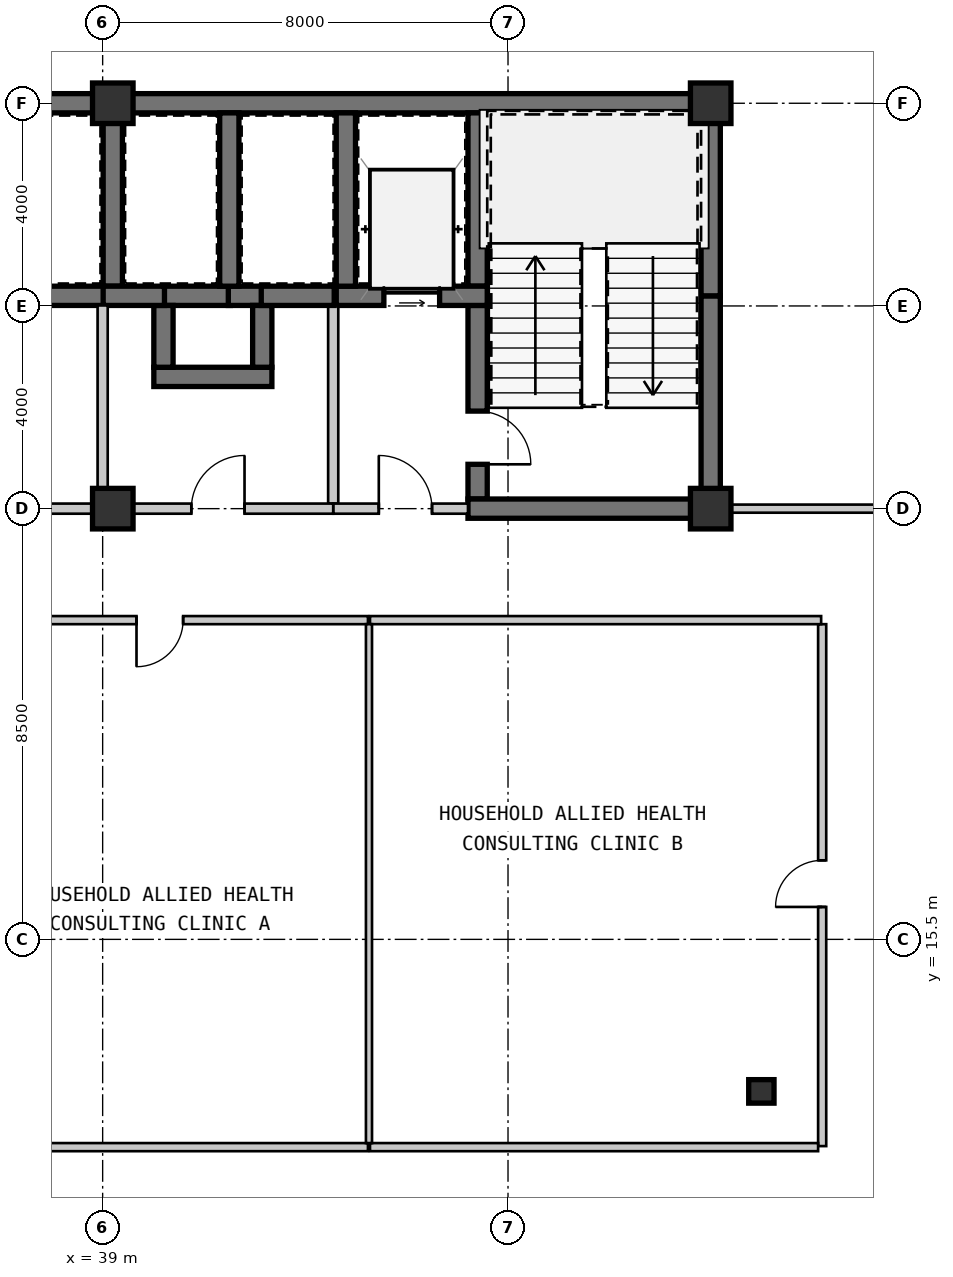
"""IFC4 building model, lengths in metres.
Left out: names, types, materials, properties, quantities, classifications, styles, units other than length and angle.
Written with IfcOpenShell. Run it as: python <this file> out.ifc"""

import sys

from ifc_helpers import new_model, si_unit, direction, frame, frame_2d, origin, origin_2d, place, context, subcontext, project, spatial, rectangle, i_section, extrude, source, transform, mapped, element, fill, save


model = new_model("IFC4")
c1 = context("Model", 3, precision=1e-05, world=origin(), true_north=direction((0.0, 1.0)))
c2 = subcontext(c1, "Body", "Model", "MODEL_VIEW")
j1 = project(units=[si_unit("LENGTHUNIT", "METRE"), si_unit("PLANEANGLEUNIT", "RADIAN")], contexts=[c1])
p1 = place(None, origin())
s1 = spatial("IfcSite", under=j1, at=p1, CompositionType="ELEMENT")
p2 = place(p1, origin())
s2 = spatial("IfcBuilding", under=s1, at=p2, CompositionType="ELEMENT")
p3 = place(p2, frame((0.0, 0.0, 57.75)))
s3 = spatial("IfcBuildingStorey", under=s2, at=p3, CompositionType="ELEMENT", Elevation=57.75)
m1 = source(origin(), c2, "Body", "SweptSolid", [
    extrude(rectangle(XDim=0.8, YDim=0.8, at=origin_2d()), origin(), (0.0, 0.0, 1.0), 3.15),
])
for number, where, z_axis, x_axis in (
    (1, (39.2, 24.0, 0.0), (0.0, 0.0, 1.0), (1.0, 0.0, 0.0)),
    (2, (51.0, 24.0, 0.0), (0.0, 0.0, 1.0), (1.0, 0.0, 0.0)),
    (3, (39.2, 32.0, 0.0), (0.0, 0.0, 1.0), (1.0, 0.0, 0.0)),
    (4, (51.0, 32.0, 0.0), (0.0, 0.0, 1.0), (1.0, 0.0, 0.0)),
):
    element("IfcColumn", number, at=place(p3, frame(where, z_axis=z_axis, x_axis=x_axis)), inside=s3, PredefinedType="COLUMN", context=c2, shape_type="MappedRepresentation", body=[
        mapped(m1, transform((0.0, 0.0, 0.0), scale=1.0)),
    ])
m2 = source(origin(), c2, "Body", "SweptSolid", [
    extrude(i_section(OverallWidth=0.5, OverallDepth=0.464, WebThickness=0.022, FlangeThickness=0.034, at=origin_2d()), origin(), (0.0, 0.0, 1.0), 3.15),
])
p4 = place(p3, frame((52.0, 12.5, 0.0), z_axis=(0.0, 0.0, 1.0), x_axis=(1.0, 0.0, 0.0)))
e5 = element("IfcColumn", 5, at=p4, inside=s3, PredefinedType="COLUMN", context=c2, shape_type="MappedRepresentation", body=[
    mapped(m2, transform((0.0, 0.0, 0.0), scale=1.0)),
])
m3 = source(origin(), c2, "Body", "SweptSolid", [
    extrude(rectangle(XDim=11.2, YDim=0.38, at=frame_2d((5.6, 0.0))), origin(), (0.0, 0.0, 1.0), 2.87),
])
p5 = place(p3, frame((28.0, 32.0, 0.0), z_axis=(0.0, 0.0, 1.0), x_axis=(1.0, 0.0, 0.0)))
e6 = element("IfcWall", 6, at=p5, inside=s3, PredefinedType="SHEAR", context=c2, shape_type="MappedRepresentation", body=[
    mapped(m3, transform((0.0, 0.0, 0.0), scale=1.0)),
])
m4 = source(origin(), c2, "Body", "SweptSolid", [
    extrude(rectangle(XDim=11.99, YDim=0.38, at=frame_2d((5.995, 0.0))), origin(), (0.0, 0.0, 1.0), 2.87),
])
p6 = place(p3, frame((39.2, 32.0, 0.0), z_axis=(0.0, 0.0, 1.0), x_axis=(1.0, 0.0, 0.0)))
e7 = element("IfcWall", 7, at=p6, inside=s3, PredefinedType="SHEAR", context=c2, shape_type="MappedRepresentation", body=[
    mapped(m4, transform((0.0, 0.0, 0.0), scale=1.0)),
])
m5 = source(origin(), c2, "Body", "SweptSolid", [
    extrude(rectangle(XDim=4.01, YDim=0.38, at=frame_2d((2.005, 0.0))), origin(), (0.0, 0.0, 1.0), 2.87),
])
p7 = place(p3, frame((51.0, 24.19, 0.0), z_axis=(0.0, 0.0, 1.0), x_axis=(0.0, 1.0, 0.0)))
e8 = element("IfcWall", 8, at=p7, inside=s3, PredefinedType="SHEAR", context=c2, shape_type="MappedRepresentation", body=[
    mapped(m5, transform((0.0, 0.0, 0.0), scale=1.0)),
])
m6 = source(origin(), c2, "Body", "SweptSolid", [
    extrude(rectangle(XDim=3.61, YDim=0.38, at=frame_2d((1.805, 0.0))), origin(), (0.0, 0.0, 1.0), 2.87),
])
p8 = place(p3, frame((51.0, 28.2, 0.0), z_axis=(0.0, 0.0, 1.0), x_axis=(0.0, 1.0, 0.0)))
e9 = element("IfcWall", 9, at=p8, inside=s3, PredefinedType="SHEAR", context=c2, shape_type="MappedRepresentation", body=[
    mapped(m6, transform((0.0, 0.0, 0.0), scale=1.0)),
])
m7 = source(origin(), c2, "Body", "SweptSolid", [
    extrude(rectangle(XDim=3.42, YDim=0.38, at=frame_2d((1.71, 0.0))), origin(), (0.0, 0.0, 1.0), 2.87),
])
p9 = place(p3, frame((46.4, 31.81, 0.0), z_axis=(0.0, 0.0, 1.0), x_axis=(0.0, -1.0, 0.0)))
e10 = element("IfcWall", 10, at=p9, inside=s3, PredefinedType="SHEAR", context=c2, shape_type="MappedRepresentation", body=[
    mapped(m7, transform((0.0, 0.0, 0.0), scale=1.0)),
])
m8 = source(origin(), c2, "Body", "SweptSolid", [
    extrude(rectangle(XDim=3.82, YDim=0.38, at=frame_2d((1.91, 0.0))), origin(), (0.0, 0.0, 1.0), 2.87),
])
p10 = place(p3, frame((46.4, 28.01, 0.0), z_axis=(0.0, 0.0, 1.0), x_axis=(0.0, -1.0, 0.0)))
e11 = element("IfcWall", 11, at=p10, inside=s3, PredefinedType="SHEAR", context=c2, shape_type="MappedRepresentation", body=[
    mapped(m8, transform((0.0, 0.0, 0.0), scale=1.0)),
])
m9 = source(origin(), c2, "Body", "SweptSolid", [
    extrude(rectangle(XDim=1.05, YDim=2.1, at=frame_2d((0.525, 1.05))), frame((0.0, 0.2, 0.0), z_axis=(0.0, -1.0, 0.0), x_axis=(1.0, 0.0, 0.0)), (0.0, 0.0, 1.0), 0.4),
])
p11 = place(p10, frame((2.085, 0.0, 0.0)))
e12 = element("IfcOpeningElement", 12, at=p11, cuts=e11, PredefinedType="OPENING", context=c2, shape_type="MappedRepresentation", body=[
    mapped(m9, transform((0.0, 0.0, 0.0), scale=1.0)),
])
m10 = source(origin(), c2, "Body", "SweptSolid", [
    extrude(rectangle(XDim=4.98, YDim=0.38, at=frame_2d((2.49, 0.0))), origin(), (0.0, 0.0, 1.0), 2.87),
])
p12 = place(p3, frame((46.21, 24.0, 0.0), z_axis=(0.0, 0.0, 1.0), x_axis=(1.0, 0.0, 0.0)))
e13 = element("IfcWall", 13, at=p12, inside=s3, PredefinedType="SHEAR", context=c2, shape_type="MappedRepresentation", body=[
    mapped(m10, transform((0.0, 0.0, 0.0), scale=1.0)),
])
m11 = source(origin(), c2, "Body", "SweptSolid", [
    extrude(rectangle(XDim=2.98, YDim=0.38, at=frame_2d((1.49, 0.0))), origin(), (0.0, 0.0, 1.0), 2.87),
])
p13 = place(p3, frame((43.61, 28.2, 0.0), z_axis=(0.0, 0.0, 1.0), x_axis=(1.0, 0.0, 0.0)))
e14 = element("IfcWall", 14, at=p13, inside=s3, PredefinedType="SHEAR", context=c2, shape_type="MappedRepresentation", body=[
    mapped(m11, transform((0.0, 0.0, 0.0), scale=1.0)),
])
m12 = source(origin(), c2, "Body", "SweptSolid", [
    extrude(rectangle(XDim=1.1, YDim=2.15, at=frame_2d((0.55, 1.075))), frame((0.0, 0.2, 0.0), z_axis=(0.0, -1.0, 0.0), x_axis=(1.0, 0.0, 0.0)), (0.0, 0.0, 1.0), 0.4),
])
p14 = place(p13, frame((0.94, 0.0, 0.0)))
e15 = element("IfcOpeningElement", 15, at=p14, cuts=e14, PredefinedType="OPENING", context=c2, shape_type="MappedRepresentation", body=[
    mapped(m12, transform((0.0, 0.0, 0.0), scale=1.0)),
])
p15 = place(p3, frame((43.8, 31.81, 0.0), z_axis=(0.0, 0.0, 1.0), x_axis=(0.0, -1.0, 0.0)))
e16 = element("IfcWall", 16, at=p15, inside=s3, PredefinedType="SHEAR", context=c2, shape_type="MappedRepresentation", body=[
    mapped(m7, transform((0.0, 0.0, 0.0), scale=1.0)),
])
m13 = source(origin(), c2, "Body", "SweptSolid", [
    extrude(rectangle(XDim=3.91, YDim=0.2, at=frame_2d((1.955, 0.0))), origin(), (0.0, 0.0, 1.0), 2.87),
])
p16 = place(p3, frame((43.55, 28.01, 0.0), z_axis=(0.0, 0.0, 1.0), x_axis=(0.0, -1.0, 0.0)))
e17 = element("IfcWall", 17, at=p16, inside=s3, PredefinedType="SOLIDWALL", context=c2, shape_type="MappedRepresentation", body=[
    mapped(m13, transform((0.0, 0.0, 0.0), scale=1.0)),
])
m14 = source(origin(), c2, "Body", "SweptSolid", [
    extrude(rectangle(XDim=2.66, YDim=0.2, at=frame_2d((1.33, 0.0))), origin(), (0.0, 0.0, 1.0), 2.337),
])
p17 = place(p3, frame((43.55, 24.0, 0.0), z_axis=(0.0, 0.0, 1.0), x_axis=(1.0, 0.0, 0.0)))
e18 = element("IfcWall", 18, at=p17, inside=s3, PredefinedType="SOLIDWALL", context=c2, shape_type="MappedRepresentation", body=[
    mapped(m14, transform((0.0, 0.0, 0.0), scale=1.0)),
])
m15 = source(origin(), c2, "Body", "SweptSolid", [
    extrude(rectangle(XDim=1.05, YDim=2.1, at=frame_2d((0.525, 1.05))), frame((0.0, 0.11, 0.0), z_axis=(0.0, -1.0, 0.0), x_axis=(1.0, 0.0, 0.0)), (0.0, 0.0, 1.0), 0.22),
])
p18 = place(p17, frame((0.9, 0.0, 0.0)))
e19 = element("IfcOpeningElement", 19, at=p18, cuts=e18, PredefinedType="OPENING", context=c2, shape_type="MappedRepresentation", body=[
    mapped(m15, transform((0.0, 0.0, 0.0), scale=1.0)),
])
m16 = source(origin(), c2, "Body", "SweptSolid", [
    extrude(rectangle(XDim=1.32, YDim=0.38, at=frame_2d((0.66, 0.0))), origin(), (0.0, 0.0, 1.0), 2.87),
])
p19 = place(p3, frame((41.52, 28.2, 0.0), z_axis=(0.0, 0.0, 1.0), x_axis=(-1.0, 0.0, 0.0)))
e20 = element("IfcWall", 20, at=p19, inside=s3, PredefinedType="SHEAR", context=c2, shape_type="MappedRepresentation", body=[
    mapped(m16, transform((0.0, 0.0, 0.0), scale=1.0)),
])
m17 = source(origin(), c2, "Body", "SweptSolid", [
    extrude(rectangle(XDim=0.67, YDim=0.38, at=frame_2d((0.335, 0.0))), origin(), (0.0, 0.0, 1.0), 2.87),
])
p20 = place(p3, frame((42.15, 28.2, 0.0), z_axis=(0.0, 0.0, 1.0), x_axis=(-1.0, 0.0, 0.0)))
e21 = element("IfcWall", 21, at=p20, inside=s3, PredefinedType="SHEAR", context=c2, shape_type="MappedRepresentation", body=[
    mapped(m17, transform((0.0, 0.0, 0.0), scale=1.0)),
])
m18 = source(origin(), c2, "Body", "SweptSolid", [
    extrude(rectangle(XDim=2.33, YDim=0.38, at=frame_2d((1.165, 0.0))), origin(), (0.0, 0.0, 1.0), 2.87),
])
p21 = place(p3, frame((40.01, 26.6, 0.0), z_axis=(0.0, 0.0, 1.0), x_axis=(1.0, 0.0, 0.0)))
e22 = element("IfcWall", 22, at=p21, inside=s3, PredefinedType="SHEAR", context=c2, shape_type="MappedRepresentation", body=[
    mapped(m18, transform((0.0, 0.0, 0.0), scale=1.0)),
])
m19 = source(origin(), c2, "Body", "SweptSolid", [
    extrude(rectangle(XDim=1.22, YDim=0.38, at=frame_2d((0.61, 0.0))), origin(), (0.0, 0.0, 1.0), 2.87),
])
for number, where, z_axis, x_axis in (
    (23, (40.2, 28.01, 0.0), (0.0, 0.0, 1.0), (0.0, -1.0, 0.0)),
    (24, (42.15, 26.79, 0.0), (0.0, 0.0, 1.0), (0.0, 1.0, 0.0)),
):
    element("IfcWall", number, at=place(p3, frame(where, z_axis=z_axis, x_axis=x_axis)), inside=s3, PredefinedType="SHEAR", context=c2, shape_type="MappedRepresentation", body=[
        mapped(m19, transform((0.0, 0.0, 0.0), scale=1.0)),
    ])
p22 = place(p3, frame((39.2, 28.39, 0.0), z_axis=(0.0, 0.0, 1.0), x_axis=(0.0, 1.0, 0.0)))
e25 = element("IfcWall", 25, at=p22, inside=s3, PredefinedType="SHEAR", context=c2, shape_type="MappedRepresentation", body=[
    mapped(m7, transform((0.0, 0.0, 0.0), scale=1.0)),
])
m20 = source(origin(), c2, "Body", "SweptSolid", [
    extrude(rectangle(XDim=2.36, YDim=0.38, at=frame_2d((1.18, 0.0))), origin(), (0.0, 0.0, 1.0), 2.87),
])
p23 = place(p3, frame((36.66, 28.2, 0.0), z_axis=(0.0, 0.0, 1.0), x_axis=(1.0, 0.0, 0.0)))
e26 = element("IfcWall", 26, at=p23, inside=s3, PredefinedType="SHEAR", context=c2, shape_type="MappedRepresentation", body=[
    mapped(m20, transform((0.0, 0.0, 0.0), scale=1.0)),
])
p24 = place(p3, frame((41.5, 28.39, 0.0), z_axis=(0.0, 0.0, 1.0), x_axis=(0.0, 1.0, 0.0)))
e27 = element("IfcWall", 27, at=p24, inside=s3, PredefinedType="SHEAR", context=c2, shape_type="MappedRepresentation", body=[
    mapped(m7, transform((0.0, 0.0, 0.0), scale=1.0)),
])
m21 = source(origin(), c2, "Body", "SweptSolid", [
    extrude(rectangle(XDim=1.21, YDim=0.38, at=frame_2d((0.605, 0.0))), origin(), (0.0, 0.0, 1.0), 2.87),
])
p25 = place(p3, frame((39.01, 28.2, 0.0), z_axis=(0.0, 0.0, 1.0), x_axis=(1.0, 0.0, 0.0)))
e28 = element("IfcWall", 28, at=p25, inside=s3, PredefinedType="SHEAR", context=c2, shape_type="MappedRepresentation", body=[
    mapped(m21, transform((0.0, 0.0, 0.0), scale=1.0)),
])
m22 = source(origin(), c2, "Body", "SweptSolid", [
    extrude(rectangle(XDim=1.44, YDim=0.38, at=frame_2d((0.72, 0.0))), origin(), (0.0, 0.0, 1.0), 2.87),
])
p26 = place(p3, frame((42.13, 28.2, 0.0), z_axis=(0.0, 0.0, 1.0), x_axis=(1.0, 0.0, 0.0)))
e29 = element("IfcWall", 29, at=p26, inside=s3, PredefinedType="SHEAR", context=c2, shape_type="MappedRepresentation", body=[
    mapped(m22, transform((0.0, 0.0, 0.0), scale=1.0)),
])
p27 = place(p3, frame((39.0, 28.01, 0.0), z_axis=(0.0, 0.0, 1.0), x_axis=(0.0, -1.0, 0.0)))
e30 = element("IfcWall", 30, at=p27, inside=s3, PredefinedType="SOLIDWALL", context=c2, shape_type="MappedRepresentation", body=[
    mapped(m13, transform((0.0, 0.0, 0.0), scale=1.0)),
])
m23 = source(origin(), c2, "Body", "SweptSolid", [
    extrude(rectangle(XDim=3.85, YDim=0.2, at=frame_2d((1.925, 0.0))), origin(), (0.0, 0.0, 1.0), 2.41),
])
p28 = place(p3, frame((39.0, 24.0, 0.0), z_axis=(0.0, 0.0, 1.0), x_axis=(-1.0, 0.0, 0.0)))
e31 = element("IfcWall", 31, at=p28, inside=s3, PredefinedType="SOLIDWALL", context=c2, shape_type="MappedRepresentation", body=[
    mapped(m23, transform((0.0, 0.0, 0.0), scale=1.0)),
])
p29 = place(p28, frame((1.4, 0.0, 0.0)))
e32 = element("IfcOpeningElement", 32, at=p29, cuts=e31, PredefinedType="OPENING", context=c2, shape_type="MappedRepresentation", body=[
    mapped(m15, transform((0.0, 0.0, 0.0), scale=1.0)),
])
m24 = source(origin(), c2, "Body", "SweptSolid", [
    extrude(rectangle(XDim=4.55, YDim=0.2, at=frame_2d((2.275, 0.0))), origin(), (0.0, 0.0, 1.0), 2.337),
])
p30 = place(p3, frame((43.55, 24.0, 0.0), z_axis=(0.0, 0.0, 1.0), x_axis=(-1.0, 0.0, 0.0)))
e33 = element("IfcWall", 33, at=p30, inside=s3, PredefinedType="SOLIDWALL", context=c2, shape_type="MappedRepresentation", body=[
    mapped(m24, transform((0.0, 0.0, 0.0), scale=1.0)),
])
p31 = place(p30, frame((1.75, 0.0, 0.0)))
e34 = element("IfcOpeningElement", 34, at=p31, cuts=e33, PredefinedType="OPENING", context=c2, shape_type="MappedRepresentation", body=[
    mapped(m15, transform((0.0, 0.0, 0.0), scale=1.0)),
])
m25 = source(origin(), c2, "Body", "SweptSolid", [
    extrude(rectangle(XDim=8.216, YDim=0.16, at=frame_2d((4.108, 0.0))), origin(), (0.0, 0.0, 1.0), 2.87),
])
p32 = place(p3, frame((44.236, 21.8, 0.0), z_axis=(0.0, 0.0, 1.0), x_axis=(-1.0, 0.0, 0.0)))
e35 = element("IfcWall", 35, at=p32, inside=s3, PredefinedType="PARTITIONING", context=c2, shape_type="MappedRepresentation", body=[
    mapped(m25, transform((0.0, 0.0, 0.0), scale=1.0)),
])
m26 = source(origin(), c2, "Body", "SweptSolid", [
    extrude(rectangle(XDim=0.92, YDim=2.1, at=frame_2d((0.46, 1.05))), frame((0.0, 0.09, 0.0), z_axis=(0.0, -1.0, 0.0), x_axis=(1.0, 0.0, 0.0)), (0.0, 0.0, 1.0), 0.18),
])
p33 = place(p32, frame((3.648, 0.0, 0.0)))
e36 = element("IfcOpeningElement", 36, at=p33, cuts=e35, PredefinedType="OPENING", context=c2, shape_type="MappedRepresentation", body=[
    mapped(m26, transform((0.0, 0.0, 0.0), scale=1.0)),
])
m27 = source(origin(), c2, "Body", "SweptSolid", [
    extrude(rectangle(XDim=10.3, YDim=0.16, at=frame_2d((5.15, 0.0))), origin(), (0.0, 0.0, 1.0), 2.87),
])
p34 = place(p3, frame((53.2, 11.42, 0.0), z_axis=(0.0, 0.0, 1.0), x_axis=(0.0, 1.0, 0.0)))
e37 = element("IfcWall", 37, at=p34, inside=s3, PredefinedType="PARTITIONING", context=c2, shape_type="MappedRepresentation", body=[
    mapped(m27, transform((0.0, 0.0, 0.0), scale=1.0)),
])
p35 = place(p34, frame((4.72, 0.0, 0.0)))
e38 = element("IfcOpeningElement", 38, at=p35, cuts=e37, PredefinedType="OPENING", context=c2, shape_type="MappedRepresentation", body=[
    mapped(m26, transform((0.0, 0.0, 0.0), scale=1.0)),
])
m28 = source(origin(), c2, "Body", "SweptSolid", [
    extrude(rectangle(XDim=8.904, YDim=0.16, at=frame_2d((4.452, 0.0))), origin(), (0.0, 0.0, 1.0), 2.87),
])
p36 = place(p3, frame((53.18, 21.8, 0.0), z_axis=(0.0, 0.0, 1.0), x_axis=(-1.0, 0.0, 0.0)))
e39 = element("IfcWall", 39, at=p36, inside=s3, PredefinedType="PARTITIONING", context=c2, shape_type="MappedRepresentation", body=[
    mapped(m28, transform((0.0, 0.0, 0.0), scale=1.0)),
])
m29 = source(origin(), c2, "Body", "SweptSolid", [
    extrude(rectangle(XDim=4.13, YDim=0.16, at=frame_2d((2.065, 0.0))), origin(), (0.0, 0.0, 1.0), 2.87),
])
p37 = place(p3, frame((51.19, 24.0, 0.0), z_axis=(0.0, 0.0, 1.0), x_axis=(1.0, 0.0, 0.0)))
e40 = element("IfcWall", 40, at=p37, inside=s3, PredefinedType="PARTITIONING", context=c2, shape_type="MappedRepresentation", body=[
    mapped(m29, transform((0.0, 0.0, 0.0), scale=1.0)),
])
p38 = place(p3, frame((36.02, 11.4, 0.0), z_axis=(0.0, 0.0, 1.0), x_axis=(1.0, 0.0, 0.0)))
e41 = element("IfcWall", 41, at=p38, inside=s3, PredefinedType="PARTITIONING", context=c2, shape_type="MappedRepresentation", body=[
    mapped(m25, transform((0.0, 0.0, 0.0), scale=1.0)),
])
m30 = source(origin(), c2, "Body", "SweptSolid", [
    extrude(rectangle(XDim=8.844, YDim=0.16, at=frame_2d((4.422, 0.0))), origin(), (0.0, 0.0, 1.0), 2.87),
])
p39 = place(p3, frame((44.276, 11.4, 0.0), z_axis=(0.0, 0.0, 1.0), x_axis=(1.0, 0.0, 0.0)))
e42 = element("IfcWall", 42, at=p39, inside=s3, PredefinedType="PARTITIONING", context=c2, shape_type="MappedRepresentation", body=[
    mapped(m30, transform((0.0, 0.0, 0.0), scale=1.0)),
])
m31 = source(origin(), c2, "Body", "SweptSolid", [
    extrude(rectangle(XDim=10.24, YDim=0.12, at=frame_2d((5.12, 0.0))), origin(), (0.0, 0.0, 1.0), 2.87),
])
p40 = place(p3, frame((44.256, 21.72, 0.0), z_axis=(0.0, 0.0, 1.0), x_axis=(0.0, -1.0, 0.0)))
e43 = element("IfcWall", 43, at=p40, inside=s3, PredefinedType="PARTITIONING", context=c2, shape_type="MappedRepresentation", body=[
    mapped(m31, transform((0.0, 0.0, 0.0), scale=1.0)),
])
m32 = source(origin(), c2, "Body", "SweptSolid", [
    extrude(rectangle(XDim=1.05, YDim=2.1, at=frame_2d((0.525, 1.05))), frame((0.0, 0.025, 0.0), z_axis=(0.0, -1.0, 0.0), x_axis=(1.0, 0.0, 0.0)), (0.0, 0.0, 1.0), 0.05),
])
p41 = place(p11, origin())
e44 = element("IfcDoor", 44, at=p41, inside=s3, OperationType="SINGLE_SWING_RIGHT", PredefinedType="DOOR", context=c2, shape_type="MappedRepresentation", body=[
    mapped(m32, transform((0.0, 0.0, 0.0), scale=1.0)),
])
fill(e12, e44)
m33 = source(origin(), c2, "Body", "SweptSolid", [
    extrude(rectangle(XDim=1.1, YDim=2.15, at=frame_2d((0.55, 1.075))), frame((0.0, 0.025, 0.0), z_axis=(0.0, -1.0, 0.0), x_axis=(1.0, 0.0, 0.0)), (0.0, 0.0, 1.0), 0.05),
])
p42 = place(p14, origin())
e45 = element("IfcDoor", 45, at=p42, inside=s3, OperationType="SLIDING_TO_LEFT", PredefinedType="DOOR", context=c2, shape_type="MappedRepresentation", body=[
    mapped(m33, transform((0.0, 0.0, 0.0), scale=1.0)),
])
fill(e15, e45)
p43 = place(p18, origin())
e46 = element("IfcDoor", 46, at=p43, inside=s3, OperationType="SINGLE_SWING_LEFT", PredefinedType="DOOR", context=c2, shape_type="MappedRepresentation", body=[
    mapped(m32, transform((0.0, 0.0, 0.0), scale=1.0)),
])
fill(e19, e46)
p44 = place(p31, frame((1.05, 0.0, 0.0), z_axis=(0.0, 0.0, 1.0), x_axis=(-1.0, 0.0, 0.0)))
e47 = element("IfcDoor", 47, at=p44, inside=s3, OperationType="SINGLE_SWING_RIGHT", PredefinedType="DOOR", context=c2, shape_type="MappedRepresentation", body=[
    mapped(m32, transform((0.0, 0.0, 0.0), scale=1.0)),
])
fill(e34, e47)
m34 = source(origin(), c2, "Body", "SweptSolid", [
    extrude(rectangle(XDim=0.92, YDim=2.1, at=frame_2d((0.46, 1.05))), frame((0.0, 0.025, 0.0), z_axis=(0.0, -1.0, 0.0), x_axis=(1.0, 0.0, 0.0)), (0.0, 0.0, 1.0), 0.05),
])
p45 = place(p33, origin())
e48 = element("IfcDoor", 48, at=p45, inside=s3, OperationType="SINGLE_SWING_RIGHT", PredefinedType="DOOR", context=c2, shape_type="MappedRepresentation", body=[
    mapped(m34, transform((0.0, 0.0, 0.0), scale=1.0)),
])
fill(e36, e48)
p46 = place(p35, origin())
e49 = element("IfcDoor", 49, at=p46, inside=s3, OperationType="SINGLE_SWING_LEFT", PredefinedType="DOOR", context=c2, shape_type="MappedRepresentation", body=[
    mapped(m34, transform((0.0, 0.0, 0.0), scale=1.0)),
])
fill(e38, e49)
save(model, sys.argv[1])
